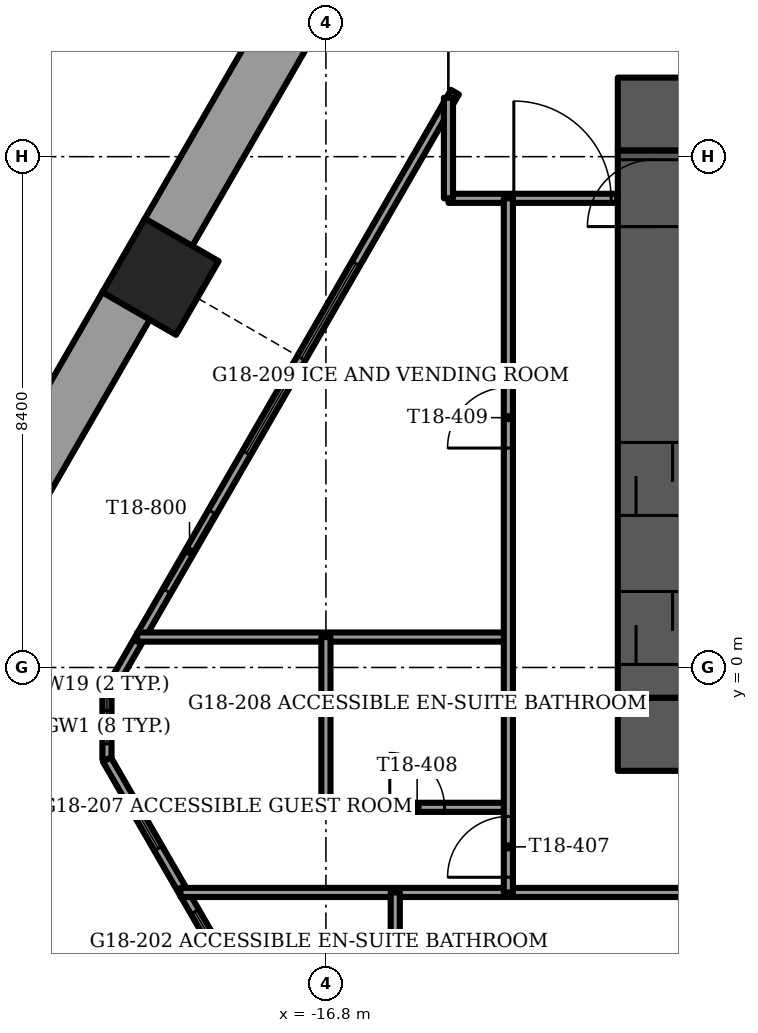
"""IFC4 building model, lengths in metres.
Left out: names, types, materials, properties, quantities, classifications, styles, units other than length and angle.
Written with IfcOpenShell. Run it as: python <this file> out.ifc"""

import sys

from ifc_helpers import new_model, si_unit, direction, frame, frame_2d, origin, origin_2d, place, context, subcontext, project, spatial, rectangle, extrude, element, fill, save


model = new_model("IFC4")
c1 = context("Model", 3, precision=1e-05, world=origin(), true_north=direction((0.0, 1.0)))
c2 = subcontext(c1, "Body", "Model", "MODEL_VIEW")
j1 = project(units=[si_unit("LENGTHUNIT", "METRE"), si_unit("PLANEANGLEUNIT", "RADIAN")], contexts=[c1])
p1 = place(None, origin())
s1 = spatial("IfcSite", under=j1, at=p1, CompositionType="ELEMENT")
p2 = place(p1, origin())
s2 = spatial("IfcBuilding", under=s1, at=p2, CompositionType="ELEMENT")
p3 = place(p2, frame((0.0, 0.0, 73.0)))
s3 = spatial("IfcBuildingStorey", under=s2, at=p3, CompositionType="ELEMENT", Elevation=73.0)
p4 = place(p3, frame((-19.521, 6.426, -1.2), z_axis=(0.0, 0.0, 1.0), x_axis=(0.5, 0.866025403784, 0.0)))
e1 = element("IfcColumn", 1, at=p4, inside=s3, PredefinedType="COLUMN", context=c2, shape_type="SweptSolid", body=[
    extrude(rectangle(XDim=1.4, YDim=1.4, at=origin_2d()), origin(), (0.0, 0.0, 1.0), 3.75),
])
p5 = place(p3, frame((-12.0, -1.1, -0.3), z_axis=(0.0, 0.0, 1.0), x_axis=(1.0, 0.0, 0.0)))
e2 = element("IfcWall", 2, at=p5, inside=s3, PredefinedType="SHEAR", context=c2, shape_type="SweptSolid", body=[
    extrude(rectangle(XDim=24.0, YDim=1.2, at=frame_2d((12.0, 0.0))), origin(), (0.0, 0.0, 1.0), 3.75),
])
p6 = place(p5, frame((11.2, 0.0, 0.0)))
e3 = element("IfcOpeningElement", 3, at=p6, cuts=e2, PredefinedType="OPENING", context=c2, shape_type="SweptSolid", body=[
    extrude(rectangle(XDim=1.6, YDim=2.1, at=frame_2d((0.8, 1.05))), frame((0.0, 0.6, 0.0), z_axis=(0.0, -1.0, 0.0), x_axis=(1.0, 0.0, 0.0)), (0.0, 0.0, 1.0), 1.2),
])
p7 = place(p3, frame((-12.0, 9.1, -0.3), z_axis=(0.0, 0.0, 1.0), x_axis=(1.0, 0.0, 0.0)))
e4 = element("IfcWall", 4, at=p7, inside=s3, PredefinedType="SHEAR", context=c2, shape_type="SweptSolid", body=[
    extrude(rectangle(XDim=24.0, YDim=1.2, at=frame_2d((12.0, 0.0))), origin(), (0.0, 0.0, 1.0), 3.75),
])
p8 = place(p7, frame((11.2, 0.0, 0.0)))
e5 = element("IfcOpeningElement", 5, at=p8, cuts=e4, PredefinedType="OPENING", context=c2, shape_type="SweptSolid", body=[
    extrude(rectangle(XDim=1.6, YDim=2.1, at=frame_2d((0.8, 1.05))), frame((0.0, 0.6, 0.0), z_axis=(0.0, -1.0, 0.0), x_axis=(1.0, 0.0, 0.0)), (0.0, 0.0, 1.0), 1.2),
])
p9 = place(p7, frame((5.25, 0.0, 0.0)))
e6 = element("IfcOpeningElement", 6, at=p9, cuts=e4, PredefinedType="OPENING", context=c2, shape_type="SweptSolid", body=[
    extrude(rectangle(XDim=1.1, YDim=2.1, at=frame_2d((0.55, 1.05))), frame((0.0, 0.6, 0.0), z_axis=(0.0, -1.0, 0.0), x_axis=(1.0, 0.0, 0.0)), (0.0, 0.0, 1.0), 1.2),
])
p10 = place(p7, frame((17.65, 0.0, 0.0)))
e7 = element("IfcOpeningElement", 7, at=p10, cuts=e4, PredefinedType="OPENING", context=c2, shape_type="SweptSolid", body=[
    extrude(rectangle(XDim=1.1, YDim=2.1, at=frame_2d((0.55, 1.05))), frame((0.0, 0.6, 0.0), z_axis=(0.0, -1.0, 0.0), x_axis=(1.0, 0.0, 0.0)), (0.0, 0.0, 1.0), 1.2),
])
p11 = place(p3, frame((-11.4, -0.5, -0.3), z_axis=(0.0, 0.0, 1.0), x_axis=(0.0, 1.0, 0.0)))
e8 = element("IfcWall", 8, at=p11, inside=s3, PredefinedType="SHEAR", context=c2, shape_type="SweptSolid", body=[
    extrude(rectangle(XDim=9.0, YDim=1.2, at=frame_2d((4.5, 0.0))), origin(), (0.0, 0.0, 1.0), 3.75),
])
p12 = place(p11, frame((7.75, 0.0, 0.0)))
e9 = element("IfcOpeningElement", 9, at=p12, cuts=e8, PredefinedType="OPENING", context=c2, shape_type="SweptSolid", body=[
    extrude(rectangle(XDim=1.1, YDim=2.1, at=frame_2d((0.55, 1.05))), frame((0.0, 0.6, 0.0), z_axis=(0.0, -1.0, 0.0), x_axis=(1.0, 0.0, 0.0)), (0.0, 0.0, 1.0), 1.2),
])
p13 = place(p11, frame((0.55, 0.0, 0.0)))
e10 = element("IfcOpeningElement", 10, at=p13, cuts=e8, PredefinedType="OPENING", context=c2, shape_type="SweptSolid", body=[
    extrude(rectangle(XDim=1.2, YDim=2.1, at=frame_2d((0.6, 1.05))), frame((0.0, 0.6, 0.0), z_axis=(0.0, -1.0, 0.0), x_axis=(1.0, 0.0, 0.0)), (0.0, 0.0, 1.0), 1.2),
])
p14 = place(p11, frame((3.0, 0.0, 0.0)))
e11 = element("IfcOpeningElement", 11, at=p14, cuts=e8, PredefinedType="OPENING", context=c2, shape_type="SweptSolid", body=[
    extrude(rectangle(XDim=1.2, YDim=2.1, at=frame_2d((0.6, 1.05))), frame((0.0, 0.6, 0.0), z_axis=(0.0, -1.0, 0.0), x_axis=(1.0, 0.0, 0.0)), (0.0, 0.0, 1.0), 1.2),
])
p15 = place(p3, frame((-15.877, 13.237, 0.0), z_axis=(0.0, 0.0, 1.0), x_axis=(-0.500012199891, -0.86601836006, 0.0)))
e12 = element("IfcWall", 12, at=p15, inside=s3, PredefinedType="PARAPET", context=c2, shape_type="SweptSolid", body=[
    extrude(rectangle(XDim=7.051, YDim=0.9, at=frame_2d((3.525, 0.0))), origin(), (0.0, 0.0, 1.0), 1.1),
])
p16 = place(p3, frame((-20.072, 5.97, 0.0), z_axis=(0.0, 0.0, 1.0), x_axis=(-0.50000343918, -0.866023418164, 0.0)))
e13 = element("IfcWall", 13, at=p16, inside=s3, PredefinedType="PARAPET", context=c2, shape_type="SweptSolid", body=[
    extrude(rectangle(XDim=7.271, YDim=0.9, at=frame_2d((3.635, 0.0))), origin(), (0.0, 0.0, 1.0), 1.1),
])
p17 = place(p3, frame((-23.707, -1.638, 0.0), z_axis=(0.0, 0.0, 1.0), x_axis=(0.500009557824, -0.866019885502, 0.0)))
e14 = element("IfcWall", 14, at=p17, inside=s3, PredefinedType="PARAPET", context=c2, shape_type="SweptSolid", body=[
    extrude(rectangle(XDim=5.57, YDim=0.9, at=frame_2d((2.785, 0.0))), origin(), (0.0, 0.0, 1.0), 1.1),
])
p18 = place(p3, frame((-14.679, 9.461, 0.0), z_axis=(0.0, 0.0, 1.0), x_axis=(-0.499991453095, -0.866030338286, 0.0)))
e15 = element("IfcWall", 15, at=p18, inside=s3, PredefinedType="SOLIDWALL", context=c2, shape_type="SweptSolid", body=[
    extrude(rectangle(XDim=11.444, YDim=0.15, at=frame_2d((5.722, 0.0))), origin(), (0.0, 0.0, 1.0), 3.45),
])
p19 = place(p18, frame((3.254, 0.0, 0.15)))
e16 = element("IfcOpeningElement", 16, at=p19, cuts=e15, PredefinedType="OPENING", context=c2, shape_type="SweptSolid", body=[
    extrude(rectangle(XDim=1.8, YDim=2.2, at=frame_2d((0.9, 1.1))), frame((0.0, 0.075, 0.0), z_axis=(0.0, -1.0, 0.0), x_axis=(1.0, 0.0, 0.0)), (0.0, 0.0, 1.0), 0.15),
])
p20 = place(p18, frame((5.354, 0.0, 0.15)))
e17 = element("IfcOpeningElement", 17, at=p20, cuts=e15, PredefinedType="OPENING", context=c2, shape_type="SweptSolid", body=[
    extrude(rectangle(XDim=1.5, YDim=2.2, at=frame_2d((0.75, 1.1))), frame((0.0, 0.075, 0.0), z_axis=(0.0, -1.0, 0.0), x_axis=(1.0, 0.0, 0.0)), (0.0, 0.0, 1.0), 0.15),
])
p21 = place(p18, frame((7.974, 0.0, 0.0)))
e18 = element("IfcOpeningElement", 18, at=p21, cuts=e15, PredefinedType="OPENING", context=c2, shape_type="SweptSolid", body=[
    extrude(rectangle(XDim=1.5, YDim=2.4, at=frame_2d((0.75, 1.2))), frame((0.0, 0.075, 0.0), z_axis=(0.0, -1.0, 0.0), x_axis=(1.0, 0.0, 0.0)), (0.0, 0.0, 1.0), 0.15),
])
p22 = place(p3, frame((-20.401, -1.514, 0.0), z_axis=(0.0, 0.0, 1.0), x_axis=(0.499991453095, -0.866030338286, 0.0)))
e19 = element("IfcWall", 19, at=p22, inside=s3, PredefinedType="SOLIDWALL", context=c2, shape_type="SweptSolid", body=[
    extrude(rectangle(XDim=11.444, YDim=0.15, at=frame_2d((5.722, 0.0))), origin(), (0.0, 0.0, 1.0), 3.45),
])
p23 = place(p22, frame((0.789, 0.0, 0.15)))
e20 = element("IfcOpeningElement", 20, at=p23, cuts=e19, PredefinedType="OPENING", context=c2, shape_type="SweptSolid", body=[
    extrude(rectangle(XDim=0.9, YDim=2.2, at=frame_2d((0.45, 1.1))), frame((0.0, 0.075, 0.0), z_axis=(0.0, -1.0, 0.0), x_axis=(1.0, 0.0, 0.0)), (0.0, 0.0, 1.0), 0.15),
])
p24 = place(p22, frame((2.889, 0.0, 0.15)))
e21 = element("IfcOpeningElement", 21, at=p24, cuts=e19, PredefinedType="OPENING", context=c2, shape_type="SweptSolid", body=[
    extrude(rectangle(XDim=1.5, YDim=2.2, at=frame_2d((0.75, 1.1))), frame((0.0, 0.075, 0.0), z_axis=(0.0, -1.0, 0.0), x_axis=(1.0, 0.0, 0.0)), (0.0, 0.0, 1.0), 0.15),
])
p25 = place(p22, frame((6.312, 0.0, 0.15)))
e22 = element("IfcOpeningElement", 22, at=p25, cuts=e19, PredefinedType="OPENING", context=c2, shape_type="SweptSolid", body=[
    extrude(rectangle(XDim=1.8, YDim=2.2, at=frame_2d((0.9, 1.1))), frame((0.0, 0.075, 0.0), z_axis=(0.0, -1.0, 0.0), x_axis=(1.0, 0.0, 0.0)), (0.0, 0.0, 1.0), 0.15),
])
p26 = place(p3, frame((-20.401, -0.449, 0.0), z_axis=(0.0, 0.0, 1.0), x_axis=(0.0, -1.0, 0.0)))
e23 = element("IfcWall", 23, at=p26, inside=s3, PredefinedType="SOLIDWALL", context=c2, shape_type="SweptSolid", body=[
    extrude(rectangle(XDim=1.065, YDim=0.15, at=frame_2d((0.532, 0.0))), origin(), (0.0, 0.0, 1.0), 3.45),
])
p27 = place(p26, frame((0.258, 0.0, 0.15)))
e24 = element("IfcOpeningElement", 24, at=p27, cuts=e23, PredefinedType="OPENING", context=c2, shape_type="SweptSolid", body=[
    extrude(rectangle(XDim=0.55, YDim=2.2, at=frame_2d((0.275, 1.1))), frame((0.0, 0.075, 0.0), z_axis=(0.0, -1.0, 0.0), x_axis=(1.0, 0.0, 0.0)), (0.0, 0.0, 1.0), 0.15),
])
p28 = place(p3, frame((-19.191, -3.7, 0.0), z_axis=(0.0, 0.0, 1.0), x_axis=(1.0, 0.0, 0.0)))
e25 = element("IfcWall", 25, at=p28, inside=s3, PredefinedType="PARTITIONING", context=c2, shape_type="SweptSolid", body=[
    extrude(rectangle(XDim=10.031, YDim=0.15, at=frame_2d((5.016, 0.0))), origin(), (0.0, 0.0, 1.0), 3.45),
])
p29 = place(p28, frame((8.791, 0.0, 0.0)))
e26 = element("IfcOpeningElement", 26, at=p29, cuts=e25, PredefinedType="OPENING", context=c2, shape_type="SweptSolid", body=[
    extrude(rectangle(XDim=1.0, YDim=2.1, at=frame_2d((0.5, 1.05))), frame((0.0, 0.075, 0.0), z_axis=(0.0, -1.0, 0.0), x_axis=(1.0, 0.0, 0.0)), (0.0, 0.0, 1.0), 0.15),
])
p30 = place(p3, frame((-16.8, -2.3, 0.0), z_axis=(0.0, 0.0, 1.0), x_axis=(1.0, 0.0, 0.0)))
e27 = element("IfcWall", 27, at=p30, inside=s3, PredefinedType="PARTITIONING", context=c2, shape_type="SweptSolid", body=[
    extrude(rectangle(XDim=3.0, YDim=0.15, at=frame_2d((1.5, 0.0))), origin(), (0.0, 0.0, 1.0), 3.45),
])
p31 = place(p30, frame((1.05, 0.0, 0.0)))
e28 = element("IfcOpeningElement", 28, at=p31, cuts=e27, PredefinedType="OPENING", context=c2, shape_type="SweptSolid", body=[
    extrude(rectangle(XDim=0.9, YDim=2.1, at=frame_2d((0.45, 1.05))), frame((0.0, 0.075, 0.0), z_axis=(0.0, -1.0, 0.0), x_axis=(1.0, 0.0, 0.0)), (0.0, 0.0, 1.0), 0.15),
])
p32 = place(p3, frame((-19.905, 0.5, 0.0), z_axis=(0.0, 0.0, 1.0), x_axis=(1.0, 0.0, 0.0)))
e29 = element("IfcWall", 29, at=p32, inside=s3, PredefinedType="PARTITIONING", context=c2, shape_type="SweptSolid", body=[
    extrude(rectangle(XDim=6.105, YDim=0.15, at=frame_2d((3.052, 0.0))), origin(), (0.0, 0.0, 1.0), 3.45),
])
p33 = place(p3, frame((-14.785, 7.715, 0.0), z_axis=(0.0, 0.0, 1.0), x_axis=(1.0, 0.0, 0.0)))
e30 = element("IfcWall", 30, at=p33, inside=s3, PredefinedType="PARTITIONING", context=c2, shape_type="SweptSolid", body=[
    extrude(rectangle(XDim=2.775, YDim=0.15, at=frame_2d((1.387, 0.0))), origin(), (0.0, 0.0, 1.0), 3.45),
])
p34 = place(p33, frame((1.075, 0.0, 0.0)))
e31 = element("IfcOpeningElement", 31, at=p34, cuts=e30, PredefinedType="OPENING", context=c2, shape_type="SweptSolid", body=[
    extrude(rectangle(XDim=1.6, YDim=2.1, at=frame_2d((0.8, 1.05))), frame((0.0, 0.075, 0.0), z_axis=(0.0, -1.0, 0.0), x_axis=(1.0, 0.0, 0.0)), (0.0, 0.0, 1.0), 0.15),
])
p35 = place(p3, frame((-13.8, -3.7, 0.0), z_axis=(0.0, 0.0, 1.0), x_axis=(0.0, 1.0, 0.0)))
e32 = element("IfcWall", 32, at=p35, inside=s3, PredefinedType="PARTITIONING", context=c2, shape_type="SweptSolid", body=[
    extrude(rectangle(XDim=11.415, YDim=0.15, at=frame_2d((5.708, 0.0))), origin(), (0.0, 0.0, 1.0), 3.45),
])
p36 = place(p35, frame((0.25, 0.0, 0.0)))
e33 = element("IfcOpeningElement", 33, at=p36, cuts=e32, PredefinedType="OPENING", context=c2, shape_type="SweptSolid", body=[
    extrude(rectangle(XDim=1.0, YDim=2.1, at=frame_2d((0.5, 1.05))), frame((0.0, 0.075, 0.0), z_axis=(0.0, -1.0, 0.0), x_axis=(1.0, 0.0, 0.0)), (0.0, 0.0, 1.0), 0.15),
])
p37 = place(p35, frame((7.308, 0.0, 0.0)))
e34 = element("IfcOpeningElement", 34, at=p37, cuts=e32, PredefinedType="OPENING", context=c2, shape_type="SweptSolid", body=[
    extrude(rectangle(XDim=1.0, YDim=2.1, at=frame_2d((0.5, 1.05))), frame((0.0, 0.075, 0.0), z_axis=(0.0, -1.0, 0.0), x_axis=(1.0, 0.0, 0.0)), (0.0, 0.0, 1.0), 0.15),
])
p38 = place(p3, frame((-14.785, 7.715, 0.0), z_axis=(0.0, 0.0, 1.0), x_axis=(0.0, 1.0, 0.0)))
e35 = element("IfcWall", 35, at=p38, inside=s3, PredefinedType="PARTITIONING", context=c2, shape_type="SweptSolid", body=[
    extrude(rectangle(XDim=1.653, YDim=0.15, at=frame_2d((0.826, 0.0))), origin(), (0.0, 0.0, 1.0), 3.45),
])
p39 = place(p3, frame((-15.66, -6.7, 0.0), z_axis=(0.0, 0.0, 1.0), x_axis=(0.0, 1.0, 0.0)))
e36 = element("IfcWall", 36, at=p39, inside=s3, PredefinedType="PARTITIONING", context=c2, shape_type="SweptSolid", body=[
    extrude(rectangle(XDim=3.0, YDim=0.15, at=frame_2d((1.5, 0.0))), origin(), (0.0, 0.0, 1.0), 3.45),
])
p40 = place(p39, frame((1.05, 0.0, 0.0)))
e37 = element("IfcOpeningElement", 37, at=p40, cuts=e36, PredefinedType="OPENING", context=c2, shape_type="SweptSolid", body=[
    extrude(rectangle(XDim=0.9, YDim=2.1, at=frame_2d((0.45, 1.05))), frame((0.0, 0.075, 0.0), z_axis=(0.0, -1.0, 0.0), x_axis=(1.0, 0.0, 0.0)), (0.0, 0.0, 1.0), 0.15),
])
p41 = place(p3, frame((-16.8, -2.3, 0.0), z_axis=(0.0, 0.0, 1.0), x_axis=(0.0, 1.0, 0.0)))
e38 = element("IfcWall", 38, at=p41, inside=s3, PredefinedType="PARTITIONING", context=c2, shape_type="SweptSolid", body=[
    extrude(rectangle(XDim=2.8, YDim=0.15, at=frame_2d((1.4, 0.0))), origin(), (0.0, 0.0, 1.0), 3.45),
])
p42 = place(p19, origin())
e39 = element("IfcWindow", 39, at=p42, inside=s3, PartitioningType="SINGLE_PANEL", PredefinedType="WINDOW", context=c2, shape_type="SweptSolid", body=[
    extrude(rectangle(XDim=1.8, YDim=2.2, at=frame_2d((0.9, 1.1))), frame((0.0, 0.03, 0.0), z_axis=(0.0, -1.0, 0.0), x_axis=(1.0, 0.0, 0.0)), (0.0, 0.0, 1.0), 0.06),
])
fill(e16, e39)
p43 = place(p20, origin())
e40 = element("IfcWindow", 40, at=p43, inside=s3, PartitioningType="SINGLE_PANEL", PredefinedType="WINDOW", context=c2, shape_type="SweptSolid", body=[
    extrude(rectangle(XDim=1.5, YDim=2.2, at=frame_2d((0.75, 1.1))), frame((0.0, 0.03, 0.0), z_axis=(0.0, -1.0, 0.0), x_axis=(1.0, 0.0, 0.0)), (0.0, 0.0, 1.0), 0.06),
])
fill(e17, e40)
p44 = place(p21, origin())
e41 = element("IfcDoor", 41, at=p44, inside=s3, OperationType="SLIDING_TO_LEFT", PredefinedType="DOOR", context=c2, shape_type="SweptSolid", body=[
    extrude(rectangle(XDim=1.5, YDim=2.4, at=frame_2d((0.75, 1.2))), frame((0.0, 0.025, 0.0), z_axis=(0.0, -1.0, 0.0), x_axis=(1.0, 0.0, 0.0)), (0.0, 0.0, 1.0), 0.05),
])
fill(e18, e41)
p45 = place(p23, origin())
e42 = element("IfcWindow", 42, at=p45, inside=s3, PartitioningType="SINGLE_PANEL", PredefinedType="WINDOW", context=c2, shape_type="SweptSolid", body=[
    extrude(rectangle(XDim=0.9, YDim=2.2, at=frame_2d((0.45, 1.1))), frame((0.0, 0.03, 0.0), z_axis=(0.0, -1.0, 0.0), x_axis=(1.0, 0.0, 0.0)), (0.0, 0.0, 1.0), 0.06),
])
fill(e20, e42)
p46 = place(p24, origin())
e43 = element("IfcWindow", 43, at=p46, inside=s3, PartitioningType="SINGLE_PANEL", PredefinedType="WINDOW", context=c2, shape_type="SweptSolid", body=[
    extrude(rectangle(XDim=1.5, YDim=2.2, at=frame_2d((0.75, 1.1))), frame((0.0, 0.03, 0.0), z_axis=(0.0, -1.0, 0.0), x_axis=(1.0, 0.0, 0.0)), (0.0, 0.0, 1.0), 0.06),
])
fill(e21, e43)
p47 = place(p27, origin())
e44 = element("IfcWindow", 44, at=p47, inside=s3, PartitioningType="SINGLE_PANEL", PredefinedType="WINDOW", context=c2, shape_type="SweptSolid", body=[
    extrude(rectangle(XDim=0.55, YDim=2.2, at=frame_2d((0.275, 1.1))), frame((0.0, 0.03, 0.0), z_axis=(0.0, -1.0, 0.0), x_axis=(1.0, 0.0, 0.0)), (0.0, 0.0, 1.0), 0.06),
])
fill(e24, e44)
p48 = place(p12, origin())
e45 = element("IfcDoor", 45, at=p48, inside=s3, OperationType="SINGLE_SWING_LEFT", PredefinedType="DOOR", context=c2, shape_type="SweptSolid", body=[
    extrude(rectangle(XDim=1.1, YDim=2.1, at=frame_2d((0.55, 1.05))), frame((0.0, 0.025, 0.0), z_axis=(0.0, -1.0, 0.0), x_axis=(1.0, 0.0, 0.0)), (0.0, 0.0, 1.0), 0.05),
])
fill(e9, e45)
p49 = place(p13, origin())
e46 = element("IfcDoor", 46, at=p49, inside=s3, OperationType="SLIDING_TO_LEFT", PredefinedType="DOOR", context=c2, shape_type="SweptSolid", body=[
    extrude(rectangle(XDim=1.2, YDim=2.1, at=frame_2d((0.6, 1.05))), frame((0.0, 0.025, 0.0), z_axis=(0.0, -1.0, 0.0), x_axis=(1.0, 0.0, 0.0)), (0.0, 0.0, 1.0), 0.05),
])
fill(e10, e46)
p50 = place(p14, origin())
e47 = element("IfcDoor", 47, at=p50, inside=s3, OperationType="SLIDING_TO_LEFT", PredefinedType="DOOR", context=c2, shape_type="SweptSolid", body=[
    extrude(rectangle(XDim=1.2, YDim=2.1, at=frame_2d((0.6, 1.05))), frame((0.0, 0.025, 0.0), z_axis=(0.0, -1.0, 0.0), x_axis=(1.0, 0.0, 0.0)), (0.0, 0.0, 1.0), 0.05),
])
fill(e11, e47)
p51 = place(p36, origin())
e48 = element("IfcDoor", 48, at=p51, inside=s3, OperationType="SINGLE_SWING_LEFT", PredefinedType="DOOR", context=c2, shape_type="SweptSolid", body=[
    extrude(rectangle(XDim=1.0, YDim=2.1, at=frame_2d((0.5, 1.05))), frame((0.0, 0.025, 0.0), z_axis=(0.0, -1.0, 0.0), x_axis=(1.0, 0.0, 0.0)), (0.0, 0.0, 1.0), 0.05),
])
fill(e33, e48)
p52 = place(p31, origin())
e49 = element("IfcDoor", 49, at=p52, inside=s3, OperationType="SINGLE_SWING_RIGHT", PredefinedType="DOOR", context=c2, shape_type="SweptSolid", body=[
    extrude(rectangle(XDim=0.9, YDim=2.1, at=frame_2d((0.45, 1.05))), frame((0.0, 0.025, 0.0), z_axis=(0.0, -1.0, 0.0), x_axis=(1.0, 0.0, 0.0)), (0.0, 0.0, 1.0), 0.05),
])
fill(e28, e49)
p53 = place(p37, origin())
e50 = element("IfcDoor", 50, at=p53, inside=s3, OperationType="SINGLE_SWING_LEFT", PredefinedType="DOOR", context=c2, shape_type="SweptSolid", body=[
    extrude(rectangle(XDim=1.0, YDim=2.1, at=frame_2d((0.5, 1.05))), frame((0.0, 0.025, 0.0), z_axis=(0.0, -1.0, 0.0), x_axis=(1.0, 0.0, 0.0)), (0.0, 0.0, 1.0), 0.05),
])
fill(e34, e50)
p54 = place(p34, origin())
e51 = element("IfcDoor", 51, at=p54, inside=s3, OperationType="DOUBLE_DOOR_SINGLE_SWING", PredefinedType="DOOR", context=c2, shape_type="SweptSolid", body=[
    extrude(rectangle(XDim=1.6, YDim=2.1, at=frame_2d((0.8, 1.05))), frame((0.0, 0.025, 0.0), z_axis=(0.0, -1.0, 0.0), x_axis=(1.0, 0.0, 0.0)), (0.0, 0.0, 1.0), 0.05),
])
fill(e31, e51)
save(model, sys.argv[1])
